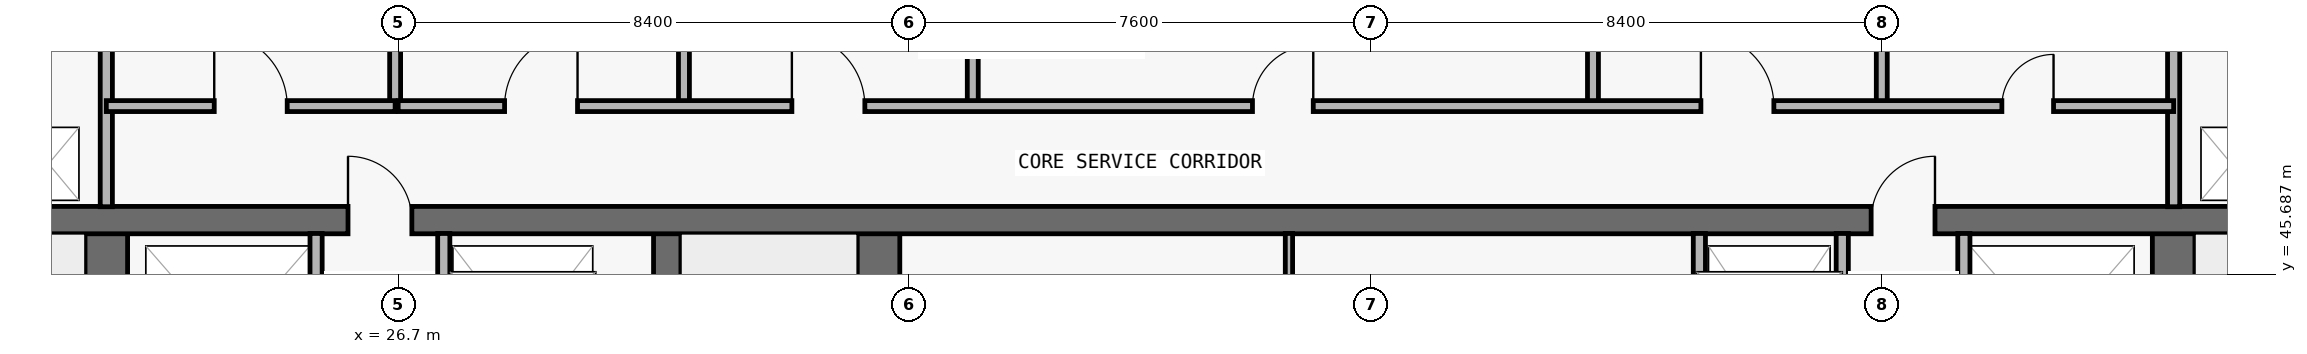
"""IFC4 building model, lengths in metres.
Left out: names, types, materials, properties, quantities, classifications, styles, units other than length and angle.
Written with IfcOpenShell. Run it as: python <this file> out.ifc"""

import sys

from ifc_helpers import new_model, si_unit, direction, frame, frame_2d, origin, place, context, subcontext, project, spatial, rectangle, extrude, element, fill, save


model = new_model("IFC4")
c1 = context("Model", 3, precision=1e-05, world=origin(), true_north=direction((0.0, 1.0)))
c2 = subcontext(c1, "Body", "Model", "MODEL_VIEW")
j1 = project(units=[si_unit("LENGTHUNIT", "METRE"), si_unit("PLANEANGLEUNIT", "RADIAN")], contexts=[c1])
p1 = place(None, origin())
s1 = spatial("IfcSite", under=j1, at=p1, CompositionType="ELEMENT")
p2 = place(p1, origin())
s2 = spatial("IfcBuilding", under=s1, at=p2, CompositionType="ELEMENT")
p3 = place(p2, frame((0.0, 0.0, 208.2)))
s3 = spatial("IfcBuildingStorey", under=s2, at=p3, CompositionType="ELEMENT", Elevation=208.2)
p4 = place(p3, frame((21.9, 37.0, 0.0), z_axis=(0.0, 0.0, 1.0), x_axis=(0.0, 1.0, 0.0)))
e1 = element("IfcWall", 1, at=p4, inside=s3, PredefinedType="SHEAR", context=c2, shape_type="SweptSolid", body=[
    extrude(rectangle(XDim=9.575, YDim=0.7, at=frame_2d((4.788, 0.0))), origin(), (0.0, 0.0, 1.0), 3.05),
])
p5 = place(p4, frame((0.55, 0.0, 0.0)))
e2 = element("IfcOpeningElement", 2, at=p5, cuts=e1, PredefinedType="OPENING", context=c2, shape_type="SweptSolid", body=[
    extrude(rectangle(XDim=1.1, YDim=2.15, at=frame_2d((0.55, 1.075))), frame((0.0, 0.36, 0.0), z_axis=(0.0, -1.0, 0.0), x_axis=(1.0, 0.0, 0.0)), (0.0, 0.0, 1.0), 0.72),
])
p6 = place(p3, frame((55.9, 37.0, 0.0), z_axis=(0.0, 0.0, 1.0), x_axis=(0.0, 1.0, 0.0)))
e3 = element("IfcWall", 3, at=p6, inside=s3, PredefinedType="SHEAR", context=c2, shape_type="SweptSolid", body=[
    extrude(rectangle(XDim=9.575, YDim=0.7, at=frame_2d((4.788, 0.0))), origin(), (0.0, 0.0, 1.0), 3.05),
])
p7 = place(p6, frame((0.55, 0.0, 0.0)))
e4 = element("IfcOpeningElement", 4, at=p7, cuts=e3, PredefinedType="OPENING", context=c2, shape_type="SweptSolid", body=[
    extrude(rectangle(XDim=1.1, YDim=2.15, at=frame_2d((0.55, 1.075))), frame((0.0, 0.36, 0.0), z_axis=(0.0, -1.0, 0.0), x_axis=(1.0, 0.0, 0.0)), (0.0, 0.0, 1.0), 0.72),
])
p8 = place(p3, frame((31.125, 37.0, 0.0), z_axis=(0.0, 0.0, 1.0), x_axis=(0.0, 1.0, 0.0)))
e5 = element("IfcWall", 5, at=p8, inside=s3, PredefinedType="SHEAR", context=c2, shape_type="SweptSolid", body=[
    extrude(rectangle(XDim=9.575, YDim=0.45, at=frame_2d((4.788, 0.0))), origin(), (0.0, 0.0, 1.0), 3.05),
])
p9 = place(p3, frame((34.6, 37.0, 0.0), z_axis=(0.0, 0.0, 1.0), x_axis=(0.0, 1.0, 0.0)))
e6 = element("IfcWall", 6, at=p9, inside=s3, PredefinedType="SHEAR", context=c2, shape_type="SweptSolid", body=[
    extrude(rectangle(XDim=9.575, YDim=0.7, at=frame_2d((4.788, 0.0))), origin(), (0.0, 0.0, 1.0), 3.05),
])
p10 = place(p3, frame((18.3, 46.575, 0.0), z_axis=(0.0, 0.0, 1.0), x_axis=(1.0, 0.0, 0.0)))
e7 = element("IfcWall", 7, at=p10, inside=s3, PredefinedType="SHEAR", context=c2, shape_type="SweptSolid", body=[
    extrude(rectangle(XDim=41.2, YDim=0.45, at=frame_2d((20.6, 0.0))), origin(), (0.0, 0.0, 1.0), 3.05),
])
p11 = place(p10, frame((7.575, 0.0, 0.0)))
e8 = element("IfcOpeningElement", 8, at=p11, cuts=e7, PredefinedType="OPENING", context=c2, shape_type="SweptSolid", body=[
    extrude(rectangle(XDim=1.05, YDim=2.15, at=frame_2d((0.525, 1.075))), frame((0.0, 0.235, 0.0), z_axis=(0.0, -1.0, 0.0), x_axis=(1.0, 0.0, 0.0)), (0.0, 0.0, 1.0), 0.47),
])
p12 = place(p10, frame((32.625, 0.0, 0.0)))
e9 = element("IfcOpeningElement", 9, at=p12, cuts=e7, PredefinedType="OPENING", context=c2, shape_type="SweptSolid", body=[
    extrude(rectangle(XDim=1.05, YDim=2.15, at=frame_2d((0.525, 1.075))), frame((0.0, 0.235, 0.0), z_axis=(0.0, -1.0, 0.0), x_axis=(1.0, 0.0, 0.0)), (0.0, 0.0, 1.0), 0.47),
])
p13 = place(p3, frame((21.9, 46.795, 0.0), z_axis=(0.0, 0.0, 1.0), x_axis=(0.0, 1.0, 0.0)))
e10 = element("IfcWall", 10, at=p13, inside=s3, PredefinedType="PARTITIONING", context=c2, shape_type="SweptSolid", body=[
    extrude(rectangle(XDim=3.16, YDim=0.2, at=frame_2d((1.58, 0.0))), origin(), (0.0, 0.0, 1.0), 3.05),
])
p14 = place(p3, frame((25.35, 43.17, 0.0), z_axis=(0.0, 0.0, 1.0), x_axis=(0.0, 1.0, 0.0)))
e11 = element("IfcWall", 11, at=p14, inside=s3, PredefinedType="PARTITIONING", context=c2, shape_type="SweptSolid", body=[
    extrude(rectangle(XDim=3.185, YDim=0.2, at=frame_2d((1.593, 0.0))), origin(), (0.0, 0.0, 1.0), 3.05),
])
p15 = place(p3, frame((26.65, 48.45, 0.0), z_axis=(0.0, 0.0, 1.0), x_axis=(0.0, 1.0, 0.0)))
e12 = element("IfcWall", 12, at=p15, inside=s3, PredefinedType="PARTITIONING", context=c2, shape_type="SweptSolid", body=[
    extrude(rectangle(XDim=1.505, YDim=0.18, at=frame_2d((0.752, 0.0))), origin(), (0.0, 0.0, 1.0), 3.05),
])
p16 = place(p3, frame((27.45, 43.17, 0.0), z_axis=(0.0, 0.0, 1.0), x_axis=(0.0, 1.0, 0.0)))
e13 = element("IfcWall", 13, at=p16, inside=s3, PredefinedType="PARTITIONING", context=c2, shape_type="SweptSolid", body=[
    extrude(rectangle(XDim=3.185, YDim=0.2, at=frame_2d((1.593, 0.0))), origin(), (0.0, 0.0, 1.0), 3.05),
])
for number, where, z_axis, x_axis in (
    (14, (31.4, 48.45, 0.0), (0.0, 0.0, 1.0), (0.0, 1.0, 0.0)),
    (15, (36.15, 48.45, 0.0), (0.0, 0.0, 1.0), (0.0, 1.0, 0.0)),
):
    element("IfcWall", number, at=place(p3, frame(where, z_axis=z_axis, x_axis=x_axis)), inside=s3, PredefinedType="PARTITIONING", context=c2, shape_type="SweptSolid", body=[
        extrude(rectangle(XDim=1.505, YDim=0.18, at=frame_2d((0.752, 0.0))), origin(), (0.0, 0.0, 1.0), 3.05),
    ])
p17 = place(p3, frame((41.35, 43.17, 0.0), z_axis=(0.0, 0.0, 1.0), x_axis=(0.0, 1.0, 0.0)))
e16 = element("IfcWall", 16, at=p17, inside=s3, PredefinedType="PARTITIONING", context=c2, shape_type="SweptSolid", body=[
    extrude(rectangle(XDim=3.185, YDim=0.12, at=frame_2d((1.593, 0.0))), origin(), (0.0, 0.0, 1.0), 3.05),
])
p18 = place(p3, frame((46.35, 48.45, 0.0), z_axis=(0.0, 0.0, 1.0), x_axis=(0.0, 1.0, 0.0)))
e17 = element("IfcWall", 17, at=p18, inside=s3, PredefinedType="PARTITIONING", context=c2, shape_type="SweptSolid", body=[
    extrude(rectangle(XDim=1.505, YDim=0.18, at=frame_2d((0.752, 0.0))), origin(), (0.0, 0.0, 1.0), 3.05),
])
for number, where, z_axis, x_axis in (
    (18, (48.1, 43.17, 0.0), (0.0, 0.0, 1.0), (0.0, 1.0, 0.0)),
    (19, (50.45, 43.17, 0.0), (0.0, 0.0, 1.0), (0.0, 1.0, 0.0)),
):
    element("IfcWall", number, at=place(p3, frame(where, z_axis=z_axis, x_axis=x_axis)), inside=s3, PredefinedType="PARTITIONING", context=c2, shape_type="SweptSolid", body=[
        extrude(rectangle(XDim=3.185, YDim=0.2, at=frame_2d((1.593, 0.0))), origin(), (0.0, 0.0, 1.0), 3.05),
    ])
p19 = place(p3, frame((51.1, 48.45, 0.0), z_axis=(0.0, 0.0, 1.0), x_axis=(0.0, 1.0, 0.0)))
e20 = element("IfcWall", 20, at=p19, inside=s3, PredefinedType="PARTITIONING", context=c2, shape_type="SweptSolid", body=[
    extrude(rectangle(XDim=1.505, YDim=0.18, at=frame_2d((0.752, 0.0))), origin(), (0.0, 0.0, 1.0), 3.05),
])
p20 = place(p3, frame((52.45, 43.17, 0.0), z_axis=(0.0, 0.0, 1.0), x_axis=(0.0, 1.0, 0.0)))
e21 = element("IfcWall", 21, at=p20, inside=s3, PredefinedType="PARTITIONING", context=c2, shape_type="SweptSolid", body=[
    extrude(rectangle(XDim=3.185, YDim=0.2, at=frame_2d((1.593, 0.0))), origin(), (0.0, 0.0, 1.0), 3.05),
])
p21 = place(p3, frame((55.9, 46.795, 0.0), z_axis=(0.0, 0.0, 1.0), x_axis=(0.0, 1.0, 0.0)))
e22 = element("IfcWall", 22, at=p21, inside=s3, PredefinedType="PARTITIONING", context=c2, shape_type="SweptSolid", body=[
    extrude(rectangle(XDim=3.16, YDim=0.2, at=frame_2d((1.58, 0.0))), origin(), (0.0, 0.0, 1.0), 3.05),
])
p22 = place(p3, frame((21.9, 48.45, 0.0), z_axis=(0.0, 0.0, 1.0), x_axis=(1.0, 0.0, 0.0)))
e23 = element("IfcWall", 23, at=p22, inside=s3, PredefinedType="PARTITIONING", context=c2, shape_type="SweptSolid", body=[
    extrude(rectangle(XDim=4.75, YDim=0.18, at=frame_2d((2.375, 0.0))), origin(), (0.0, 0.0, 1.0), 3.05),
])
p23 = place(p22, frame((1.775, 0.0, 0.0)))
e24 = element("IfcOpeningElement", 24, at=p23, cuts=e23, PredefinedType="OPENING", context=c2, shape_type="SweptSolid", body=[
    extrude(rectangle(XDim=1.2, YDim=2.2, at=frame_2d((0.6, 1.1))), frame((0.0, 0.1, 0.0), z_axis=(0.0, -1.0, 0.0), x_axis=(1.0, 0.0, 0.0)), (0.0, 0.0, 1.0), 0.2),
])
p24 = place(p3, frame((26.7, 48.45, 0.0), z_axis=(0.0, 0.0, 1.0), x_axis=(1.0, 0.0, 0.0)))
e25 = element("IfcWall", 25, at=p24, inside=s3, PredefinedType="PARTITIONING", context=c2, shape_type="SweptSolid", body=[
    extrude(rectangle(XDim=29.2, YDim=0.18, at=frame_2d((14.6, 0.0))), origin(), (0.0, 0.0, 1.0), 3.05),
])
p25 = place(p24, frame((1.75, 0.0, 0.0)))
e26 = element("IfcOpeningElement", 26, at=p25, cuts=e25, PredefinedType="OPENING", context=c2, shape_type="SweptSolid", body=[
    extrude(rectangle(XDim=1.2, YDim=2.2, at=frame_2d((0.6, 1.1))), frame((0.0, 0.1, 0.0), z_axis=(0.0, -1.0, 0.0), x_axis=(1.0, 0.0, 0.0)), (0.0, 0.0, 1.0), 0.2),
])
p26 = place(p24, frame((6.475, 0.0, 0.0)))
e27 = element("IfcOpeningElement", 27, at=p26, cuts=e25, PredefinedType="OPENING", context=c2, shape_type="SweptSolid", body=[
    extrude(rectangle(XDim=1.2, YDim=2.2, at=frame_2d((0.6, 1.1))), frame((0.0, 0.1, 0.0), z_axis=(0.0, -1.0, 0.0), x_axis=(1.0, 0.0, 0.0)), (0.0, 0.0, 1.0), 0.2),
])
p27 = place(p24, frame((14.05, 0.0, 0.0)))
e28 = element("IfcOpeningElement", 28, at=p27, cuts=e25, PredefinedType="OPENING", context=c2, shape_type="SweptSolid", body=[
    extrude(rectangle(XDim=1.0, YDim=2.2, at=frame_2d((0.5, 1.1))), frame((0.0, 0.1, 0.0), z_axis=(0.0, -1.0, 0.0), x_axis=(1.0, 0.0, 0.0)), (0.0, 0.0, 1.0), 0.2),
])
p28 = place(p24, frame((21.425, 0.0, 0.0)))
e29 = element("IfcOpeningElement", 29, at=p28, cuts=e25, PredefinedType="OPENING", context=c2, shape_type="SweptSolid", body=[
    extrude(rectangle(XDim=1.2, YDim=2.2, at=frame_2d((0.6, 1.1))), frame((0.0, 0.1, 0.0), z_axis=(0.0, -1.0, 0.0), x_axis=(1.0, 0.0, 0.0)), (0.0, 0.0, 1.0), 0.2),
])
p29 = place(p24, frame((26.375, 0.0, 0.0)))
e30 = element("IfcOpeningElement", 30, at=p29, cuts=e25, PredefinedType="OPENING", context=c2, shape_type="SweptSolid", body=[
    extrude(rectangle(XDim=0.85, YDim=2.1, at=frame_2d((0.425, 1.05))), frame((0.0, 0.1, 0.0), z_axis=(0.0, -1.0, 0.0), x_axis=(1.0, 0.0, 0.0)), (0.0, 0.0, 1.0), 0.2),
])
p30 = place(p11, origin())
e31 = element("IfcDoor", 31, at=p30, inside=s3, OperationType="SINGLE_SWING_LEFT", PredefinedType="DOOR", context=c2, shape_type="SweptSolid", body=[
    extrude(rectangle(XDim=1.05, YDim=2.15, at=frame_2d((0.525, 1.075))), frame((0.0, 0.025, 0.0), z_axis=(0.0, -1.0, 0.0), x_axis=(1.0, 0.0, 0.0)), (0.0, 0.0, 1.0), 0.05),
])
fill(e8, e31)
p31 = place(p12, origin())
e32 = element("IfcDoor", 32, at=p31, inside=s3, OperationType="SINGLE_SWING_RIGHT", PredefinedType="DOOR", context=c2, shape_type="SweptSolid", body=[
    extrude(rectangle(XDim=1.05, YDim=2.15, at=frame_2d((0.525, 1.075))), frame((0.0, 0.025, 0.0), z_axis=(0.0, -1.0, 0.0), x_axis=(1.0, 0.0, 0.0)), (0.0, 0.0, 1.0), 0.05),
])
fill(e9, e32)
p32 = place(p23, origin())
e33 = element("IfcDoor", 33, at=p32, inside=s3, OperationType="SINGLE_SWING_LEFT", PredefinedType="DOOR", context=c2, shape_type="SweptSolid", body=[
    extrude(rectangle(XDim=1.2, YDim=2.2, at=frame_2d((0.6, 1.1))), frame((0.0, 0.025, 0.0), z_axis=(0.0, -1.0, 0.0), x_axis=(1.0, 0.0, 0.0)), (0.0, 0.0, 1.0), 0.05),
])
fill(e24, e33)
p33 = place(p25, origin())
e34 = element("IfcDoor", 34, at=p33, inside=s3, OperationType="SINGLE_SWING_RIGHT", PredefinedType="DOOR", context=c2, shape_type="SweptSolid", body=[
    extrude(rectangle(XDim=1.2, YDim=2.2, at=frame_2d((0.6, 1.1))), frame((0.0, 0.025, 0.0), z_axis=(0.0, -1.0, 0.0), x_axis=(1.0, 0.0, 0.0)), (0.0, 0.0, 1.0), 0.05),
])
fill(e26, e34)
p34 = place(p26, origin())
e35 = element("IfcDoor", 35, at=p34, inside=s3, OperationType="SINGLE_SWING_LEFT", PredefinedType="DOOR", context=c2, shape_type="SweptSolid", body=[
    extrude(rectangle(XDim=1.2, YDim=2.2, at=frame_2d((0.6, 1.1))), frame((0.0, 0.025, 0.0), z_axis=(0.0, -1.0, 0.0), x_axis=(1.0, 0.0, 0.0)), (0.0, 0.0, 1.0), 0.05),
])
fill(e27, e35)
p35 = place(p27, origin())
e36 = element("IfcDoor", 36, at=p35, inside=s3, OperationType="SINGLE_SWING_RIGHT", PredefinedType="DOOR", context=c2, shape_type="SweptSolid", body=[
    extrude(rectangle(XDim=1.0, YDim=2.2, at=frame_2d((0.5, 1.1))), frame((0.0, 0.025, 0.0), z_axis=(0.0, -1.0, 0.0), x_axis=(1.0, 0.0, 0.0)), (0.0, 0.0, 1.0), 0.05),
])
fill(e28, e36)
p36 = place(p28, origin())
e37 = element("IfcDoor", 37, at=p36, inside=s3, OperationType="SINGLE_SWING_LEFT", PredefinedType="DOOR", context=c2, shape_type="SweptSolid", body=[
    extrude(rectangle(XDim=1.2, YDim=2.2, at=frame_2d((0.6, 1.1))), frame((0.0, 0.025, 0.0), z_axis=(0.0, -1.0, 0.0), x_axis=(1.0, 0.0, 0.0)), (0.0, 0.0, 1.0), 0.05),
])
fill(e29, e37)
p37 = place(p29, origin())
e38 = element("IfcDoor", 38, at=p37, inside=s3, OperationType="SINGLE_SWING_RIGHT", PredefinedType="DOOR", context=c2, shape_type="SweptSolid", body=[
    extrude(rectangle(XDim=0.85, YDim=2.1, at=frame_2d((0.425, 1.05))), frame((0.0, 0.025, 0.0), z_axis=(0.0, -1.0, 0.0), x_axis=(1.0, 0.0, 0.0)), (0.0, 0.0, 1.0), 0.05),
])
fill(e30, e38)
save(model, sys.argv[1])
